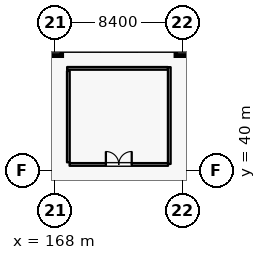
"""IFC4 building model, lengths in metres.
Left out: names, types, materials, properties, quantities, classifications, styles, units other than length and angle.
Written with IfcOpenShell. Run it as: python <this file> out.ifc"""

import sys

from ifc_helpers import new_model, si_unit, direction, frame, frame_2d, origin, origin_2d, place, context, subcontext, project, spatial, rectangle, circle, extrude, element, fill, save


model = new_model("IFC4")
c1 = context("Model", 3, precision=1e-05, world=origin(), true_north=direction((0.0, 1.0)))
c2 = subcontext(c1, "Body", "Model", "MODEL_VIEW")
j1 = project(units=[si_unit("LENGTHUNIT", "METRE"), si_unit("PLANEANGLEUNIT", "RADIAN")], contexts=[c1])
p1 = place(None, origin())
s1 = spatial("IfcSite", under=j1, at=p1, CompositionType="ELEMENT")
p2 = place(p1, origin())
s2 = spatial("IfcBuilding", under=s1, at=p2, CompositionType="ELEMENT")
p3 = place(p2, origin())
s3 = spatial("IfcBuildingStorey", under=s2, at=p3, CompositionType="ELEMENT", Elevation=0.0)
for number, where, z_axis, x_axis in (
    (1, (168.0, 48.0, 0.0), (0.0, 0.0, 1.0), (1.0, 0.0, 0.0)),
    (2, (176.4, 48.0, 0.0), (0.0, 0.0, 1.0), (1.0, 0.0, 0.0)),
):
    element("IfcColumn", number, at=place(p3, frame(where, z_axis=z_axis, x_axis=x_axis)), inside=s3, PredefinedType="COLUMN", context=c2, shape_type="SweptSolid", body=[
        extrude(circle(Radius=0.45, at=origin_2d()), origin(), (0.0, 0.0, 1.0), 6.0),
    ])
p4 = place(p3, frame((168.96, 40.4, 0.0), z_axis=(0.0, 0.0, 1.0), x_axis=(1.0, 0.0, 0.0)))
e3 = element("IfcWall", 3, at=p4, inside=s3, PredefinedType="PARTITIONING", context=c2, shape_type="SweptSolid", body=[
    extrude(rectangle(XDim=6.48, YDim=0.18, at=frame_2d((3.24, 0.0))), origin(), (0.0, 0.0, 1.0), 5.675),
])
p5 = place(p4, frame((2.39, 0.0, 0.0)))
e4 = element("IfcOpeningElement", 4, at=p5, cuts=e3, PredefinedType="OPENING", context=c2, shape_type="SweptSolid", body=[
    extrude(rectangle(XDim=1.7, YDim=2.3, at=frame_2d((0.85, 1.15))), frame((0.0, 0.1, 0.0), z_axis=(0.0, -1.0, 0.0), x_axis=(1.0, 0.0, 0.0)), (0.0, 0.0, 1.0), 0.2),
])
p6 = place(p3, frame((168.88, 40.54, 0.0), z_axis=(0.0, 0.0, 1.0), x_axis=(0.0, 1.0, 0.0)))
e5 = element("IfcWall", 5, at=p6, inside=s3, PredefinedType="PARTITIONING", context=c2, shape_type="SweptSolid", body=[
    extrude(rectangle(XDim=6.01, YDim=0.18, at=frame_2d((3.005, 0.0))), origin(), (0.0, 0.0, 1.0), 5.675),
])
p7 = place(p3, frame((175.52, 40.432, 0.0), z_axis=(0.0, 0.0, 1.0), x_axis=(0.0, 1.0, 0.0)))
e6 = element("IfcWall", 6, at=p7, inside=s3, PredefinedType="PARTITIONING", context=c2, shape_type="SweptSolid", body=[
    extrude(rectangle(XDim=6.368, YDim=0.18, at=frame_2d((3.184, 0.0))), origin(), (0.0, 0.0, 1.0), 5.675),
])
p8 = place(p3, frame((168.8, 46.72, 0.0), z_axis=(0.0, 0.0, 1.0), x_axis=(1.0, 0.0, 0.0)))
e7 = element("IfcWall", 7, at=p8, inside=s3, PredefinedType="PARTITIONING", context=c2, shape_type="SweptSolid", body=[
    extrude(rectangle(XDim=6.63, YDim=0.18, at=frame_2d((3.315, 0.0))), origin(), (0.0, 0.0, 1.0), 5.675),
])
p9 = place(p5, origin())
e8 = element("IfcDoor", 8, at=p9, inside=s3, OperationType="DOUBLE_DOOR_SINGLE_SWING", PredefinedType="DOOR", context=c2, shape_type="SweptSolid", body=[
    extrude(rectangle(XDim=1.7, YDim=2.3, at=frame_2d((0.85, 1.15))), frame((0.0, 0.025, 0.0), z_axis=(0.0, -1.0, 0.0), x_axis=(1.0, 0.0, 0.0)), (0.0, 0.0, 1.0), 0.05),
])
fill(e4, e8)
save(model, sys.argv[1])
